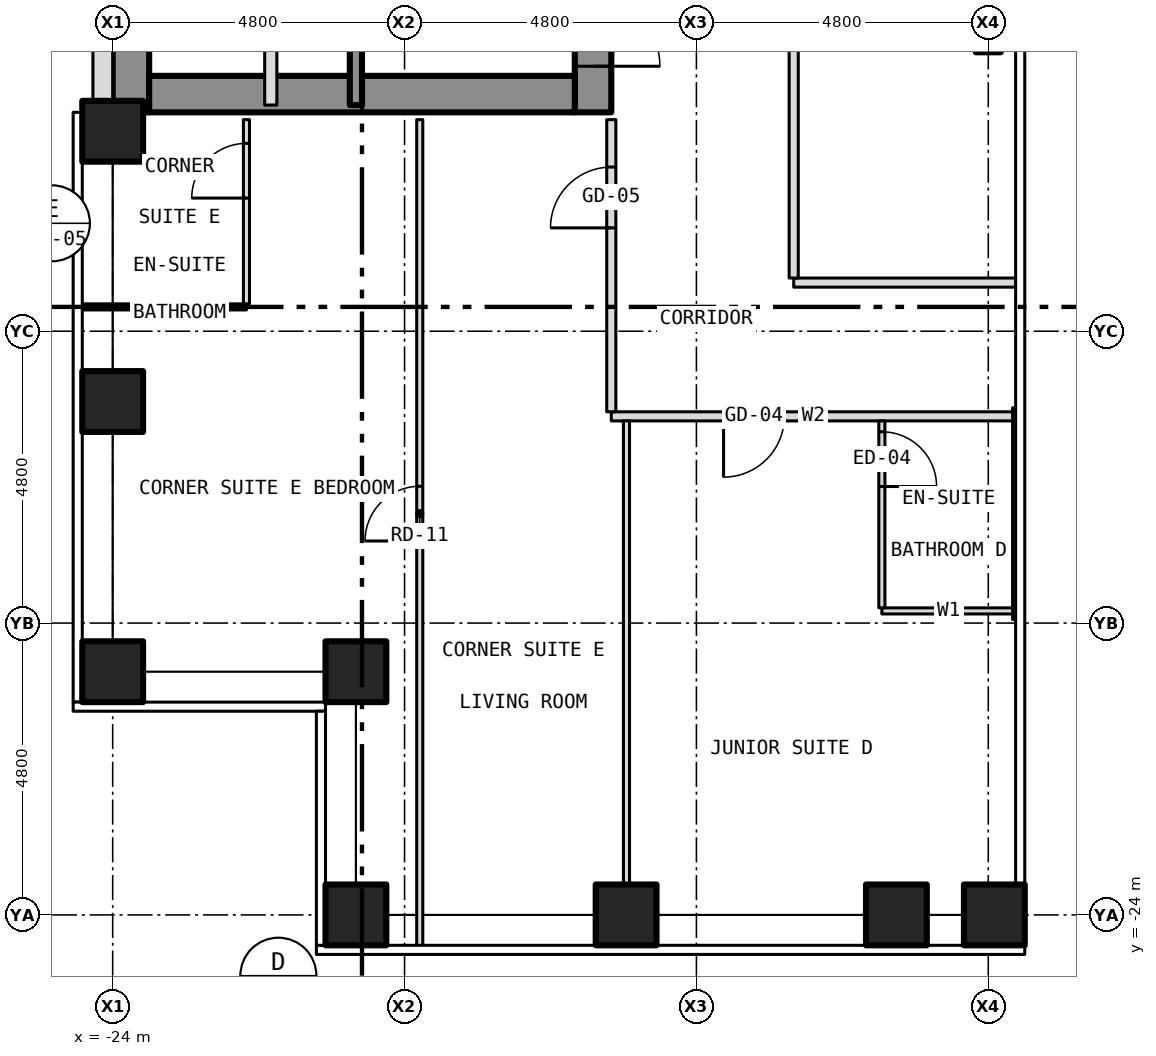
"""IFC4 building model, lengths in metres.
Left out: names, types, materials, properties, quantities, classifications, styles, units other than length and angle.
Written with IfcOpenShell. Run it as: python <this file> out.ifc"""

import sys

from ifc_helpers import new_model, si_unit, direction, frame, frame_2d, origin, origin_2d, place, context, subcontext, project, spatial, rectangle, hollow_rectangle, i_section, extrude, element, fill, save


model = new_model("IFC4")
c1 = context("Model", 3, precision=1e-05, world=origin(), true_north=direction((0.0, 1.0)))
c2 = subcontext(c1, "Body", "Model", "MODEL_VIEW")
j1 = project(units=[si_unit("LENGTHUNIT", "METRE"), si_unit("PLANEANGLEUNIT", "RADIAN")], contexts=[c1])
p1 = place(None, origin())
s1 = spatial("IfcSite", under=j1, at=p1, CompositionType="ELEMENT")
p2 = place(p1, origin())
s2 = spatial("IfcBuilding", under=s1, at=p2, CompositionType="ELEMENT")
p3 = place(p2, frame((0.0, 0.0, 63.5)))
s3 = spatial("IfcBuildingStorey", under=s2, at=p3, CompositionType="ELEMENT", Elevation=63.5)
for number, where, z_axis, x_axis in (
    (1, (-20.0, -24.0, -0.15), (0.0, 0.0, 1.0), (1.0, 0.0, 0.0)),
    (2, (-15.556, -24.0, -0.15), (0.0, 0.0, 1.0), (1.0, 0.0, 0.0)),
    (3, (-11.111, -24.0, -0.15), (0.0, 0.0, 1.0), (1.0, 0.0, 0.0)),
    (4, (-24.0, -20.0, -0.15), (0.0, 0.0, 1.0), (1.0, 0.0, 0.0)),
    (5, (-24.0, -15.556, -0.15), (0.0, 0.0, 1.0), (1.0, 0.0, 0.0)),
    (6, (-24.0, -11.111, -0.15), (0.0, 0.0, 1.0), (1.0, 0.0, 0.0)),
    (7, (-20.0, -20.0, -0.15), (0.0, 0.0, 1.0), (1.0, 0.0, 0.0)),
    (8, (-9.5, -24.0, -0.15), (0.0, 0.0, 1.0), (1.0, 0.0, 0.0)),
):
    element("IfcColumn", number, at=place(p3, frame(where, z_axis=z_axis, x_axis=x_axis)), inside=s3, PredefinedType="COLUMN", context=c2, shape_type="SweptSolid", body=[
        extrude(hollow_rectangle(XDim=1.0, YDim=1.0, WallThickness=0.06, at=origin_2d()), origin(), (0.0, 0.0, 1.0), 3.5),
    ])
p4 = place(p3, frame((-9.6, -9.6, -0.15), z_axis=(0.0, 0.0, 1.0), x_axis=(1.0, 0.0, 0.0)))
e9 = element("IfcColumn", 9, at=p4, inside=s3, PredefinedType="COLUMN", context=c2, shape_type="SweptSolid", body=[
    extrude(i_section(OverallWidth=0.409, OverallDepth=0.424, WebThickness=0.033, FlangeThickness=0.052, at=origin_2d()), origin(), (0.0, 0.0, 1.0), 3.5),
])
p5 = place(p3, frame((-16.1, -10.8, 0.0), z_axis=(0.0, 0.0, 1.0), x_axis=(0.0, 1.0, 0.0)))
e10 = element("IfcWall", 10, at=p5, inside=s3, PredefinedType="SHEAR", context=c2, shape_type="SweptSolid", body=[
    extrude(rectangle(XDim=21.6, YDim=0.6, at=frame_2d((10.8, 0.0))), origin(), (0.0, 0.0, 1.0), 3.25),
])
p6 = place(p5, frame((9.4, 0.0, 0.0)))
e11 = element("IfcOpeningElement", 11, at=p6, cuts=e10, PredefinedType="OPENING", context=c2, shape_type="SweptSolid", body=[
    extrude(rectangle(XDim=1.1, YDim=2.1, at=frame_2d((0.55, 1.05))), frame((0.0, 0.312, 0.0), z_axis=(0.0, -1.0, 0.0), x_axis=(1.0, 0.0, 0.0)), (0.0, 0.0, 1.0), 0.624),
])
p7 = place(p5, frame((11.5, 0.0, 0.0)))
e12 = element("IfcOpeningElement", 12, at=p7, cuts=e10, PredefinedType="OPENING", context=c2, shape_type="SweptSolid", body=[
    extrude(rectangle(XDim=1.1, YDim=2.1, at=frame_2d((0.55, 1.05))), frame((0.0, 0.312, 0.0), z_axis=(0.0, -1.0, 0.0), x_axis=(1.0, 0.0, 0.0)), (0.0, 0.0, 1.0), 0.624),
])
p8 = place(p5, frame((13.6, 0.0, 0.0)))
e13 = element("IfcOpeningElement", 13, at=p8, cuts=e10, PredefinedType="OPENING", context=c2, shape_type="SweptSolid", body=[
    extrude(rectangle(XDim=1.1, YDim=2.1, at=frame_2d((0.55, 1.05))), frame((0.0, 0.312, 0.0), z_axis=(0.0, -1.0, 0.0), x_axis=(1.0, 0.0, 0.0)), (0.0, 0.0, 1.0), 0.624),
])
p9 = place(p5, frame((15.7, 0.0, 0.0)))
e14 = element("IfcOpeningElement", 14, at=p9, cuts=e10, PredefinedType="OPENING", context=c2, shape_type="SweptSolid", body=[
    extrude(rectangle(XDim=1.1, YDim=2.1, at=frame_2d((0.55, 1.05))), frame((0.0, 0.312, 0.0), z_axis=(0.0, -1.0, 0.0), x_axis=(1.0, 0.0, 0.0)), (0.0, 0.0, 1.0), 0.624),
])
p10 = place(p5, frame((17.8, 0.0, 0.0)))
e15 = element("IfcOpeningElement", 15, at=p10, cuts=e10, PredefinedType="OPENING", context=c2, shape_type="SweptSolid", body=[
    extrude(rectangle(XDim=1.1, YDim=2.1, at=frame_2d((0.55, 1.05))), frame((0.0, 0.312, 0.0), z_axis=(0.0, -1.0, 0.0), x_axis=(1.0, 0.0, 0.0)), (0.0, 0.0, 1.0), 0.624),
])
p11 = place(p5, frame((0.758, 0.0, 0.0)))
e16 = element("IfcOpeningElement", 16, at=p11, cuts=e10, PredefinedType="OPENING", context=c2, shape_type="SweptSolid", body=[
    extrude(rectangle(XDim=1.1, YDim=2.1, at=frame_2d((0.55, 1.05))), frame((0.0, 0.312, 0.0), z_axis=(0.0, -1.0, 0.0), x_axis=(1.0, 0.0, 0.0)), (0.0, 0.0, 1.0), 0.624),
])
p12 = place(p5, frame((7.5, 0.0, 0.0)))
e17 = element("IfcOpeningElement", 17, at=p12, cuts=e10, PredefinedType="OPENING", context=c2, shape_type="SweptSolid", body=[
    extrude(rectangle(XDim=1.1, YDim=2.1, at=frame_2d((0.55, 1.05))), frame((0.0, 0.312, 0.0), z_axis=(0.0, -1.0, 0.0), x_axis=(1.0, 0.0, 0.0)), (0.0, 0.0, 1.0), 0.624),
])
p13 = place(p3, frame((-23.7, -10.8, 0.0), z_axis=(0.0, 0.0, 1.0), x_axis=(0.0, 1.0, 0.0)))
e18 = element("IfcWall", 18, at=p13, inside=s3, PredefinedType="SHEAR", context=c2, shape_type="SweptSolid", body=[
    extrude(rectangle(XDim=21.6, YDim=0.6, at=frame_2d((10.8, 0.0))), origin(), (0.0, 0.0, 1.0), 3.25),
])
p14 = place(p3, frame((-23.4, -10.5, 0.0), z_axis=(0.0, 0.0, 1.0), x_axis=(1.0, 0.0, 0.0)))
e19 = element("IfcWall", 19, at=p14, inside=s3, PredefinedType="SHEAR", context=c2, shape_type="SweptSolid", body=[
    extrude(rectangle(XDim=7.0, YDim=0.6, at=frame_2d((3.5, 0.0))), origin(), (0.0, 0.0, 1.0), 3.25),
])
p15 = place(p3, frame((-24.163, 10.8, 0.0), z_axis=(0.0, 0.0, 1.0), x_axis=(0.0, -1.0, 0.0)))
e20 = element("IfcWall", 20, at=p15, inside=s3, PredefinedType="SOLIDWALL", context=c2, shape_type="SweptSolid", body=[
    extrude(rectangle(XDim=21.6, YDim=0.325, at=frame_2d((10.8, 0.0))), origin(), (0.0, 0.0, 1.0), 3.5),
])
p16 = place(p15, frame((18.05, 0.0, 1.0)))
e21 = element("IfcOpeningElement", 21, at=p16, cuts=e20, PredefinedType="OPENING", context=c2, shape_type="SweptSolid", body=[
    extrude(rectangle(XDim=0.6, YDim=1.5, at=frame_2d((0.3, 0.75))), frame((0.0, 0.175, 0.0), z_axis=(0.0, -1.0, 0.0), x_axis=(1.0, 0.0, 0.0)), (0.0, 0.0, 1.0), 0.349),
])
p17 = place(p3, frame((-11.35, -19.0, 0.0), z_axis=(0.0, 0.0, 1.0), x_axis=(1.0, 0.0, 0.0)))
e22 = element("IfcWall", 22, at=p17, inside=s3, PredefinedType="PARTITIONING", context=c2, shape_type="SweptSolid", body=[
    extrude(rectangle(XDim=2.2, YDim=0.1, at=frame_2d((1.1, 0.0))), origin(), (0.0, 0.0, 1.0), 3.35),
])
p18 = place(p3, frame((-15.8, -15.8, 0.0), z_axis=(0.0, 0.0, 1.0), x_axis=(1.0, 0.0, 0.0)))
e23 = element("IfcWall", 23, at=p18, inside=s3, PredefinedType="PARTITIONING", context=c2, shape_type="SweptSolid", body=[
    extrude(rectangle(XDim=6.65, YDim=0.15, at=frame_2d((3.325, 0.0))), origin(), (0.0, 0.0, 1.0), 3.35),
])
p19 = place(p18, frame((1.847, 0.0, 0.0)))
e24 = element("IfcOpeningElement", 24, at=p19, cuts=e23, PredefinedType="OPENING", context=c2, shape_type="SweptSolid", body=[
    extrude(rectangle(XDim=1.0, YDim=2.1, at=frame_2d((0.5, 1.05))), frame((0.0, 0.087, 0.0), z_axis=(0.0, -1.0, 0.0), x_axis=(1.0, 0.0, 0.0)), (0.0, 0.0, 1.0), 0.174),
])
p20 = place(p3, frame((-24.53, -14.0, 0.0), z_axis=(0.0, 0.0, 1.0), x_axis=(1.0, 0.0, 0.0)))
e25 = element("IfcWall", 25, at=p20, inside=s3, PredefinedType="PARTITIONING", context=c2, shape_type="SweptSolid", body=[
    extrude(rectangle(XDim=2.73, YDim=0.1, at=frame_2d((1.365, 0.0))), origin(), (0.0, 0.0, 1.0), 3.35),
])
p21 = place(p3, frame((-12.8, -13.6, 0.0), z_axis=(0.0, 0.0, 1.0), x_axis=(1.0, 0.0, 0.0)))
e26 = element("IfcWall", 26, at=p21, inside=s3, PredefinedType="PARTITIONING", context=c2, shape_type="SweptSolid", body=[
    extrude(rectangle(XDim=3.68, YDim=0.15, at=frame_2d((1.84, 0.0))), origin(), (0.0, 0.0, 1.0), 3.35),
])
p22 = place(p3, frame((-21.8, -13.95, 0.0), z_axis=(0.0, 0.0, 1.0), x_axis=(0.0, 1.0, 0.0)))
e27 = element("IfcWall", 27, at=p22, inside=s3, PredefinedType="PARTITIONING", context=c2, shape_type="SweptSolid", body=[
    extrude(rectangle(XDim=3.03, YDim=0.1, at=frame_2d((1.515, 0.0))), origin(), (0.0, 0.0, 1.0), 3.35),
])
p23 = place(p22, frame((1.74, 0.0, 0.0)))
e28 = element("IfcOpeningElement", 28, at=p23, cuts=e27, PredefinedType="OPENING", context=c2, shape_type="SweptSolid", body=[
    extrude(rectangle(XDim=0.9, YDim=2.1, at=frame_2d((0.45, 1.05))), frame((0.0, 0.062, 0.0), z_axis=(0.0, -1.0, 0.0), x_axis=(1.0, 0.0, 0.0)), (0.0, 0.0, 1.0), 0.124),
])
p24 = place(p3, frame((-21.4, -10.68, 0.0), z_axis=(0.0, 0.0, 1.0), x_axis=(0.0, 1.0, 0.0)))
e29 = element("IfcWall", 29, at=p24, inside=s3, PredefinedType="PARTITIONING", context=c2, shape_type="SweptSolid", body=[
    extrude(rectangle(XDim=8.68, YDim=0.2, at=frame_2d((4.34, 0.0))), origin(), (0.0, 0.0, 1.0), 3.25),
])
p25 = place(p24, frame((2.1, 0.0, 0.0)))
e30 = element("IfcOpeningElement", 30, at=p25, cuts=e29, PredefinedType="OPENING", context=c2, shape_type="SweptSolid", body=[
    extrude(rectangle(XDim=0.9, YDim=2.1, at=frame_2d((0.45, 1.05))), frame((0.0, 0.112, 0.0), z_axis=(0.0, -1.0, 0.0), x_axis=(1.0, 0.0, 0.0)), (0.0, 0.0, 1.0), 0.224),
])
p26 = place(p24, frame((6.55, 0.0, 0.0)))
e31 = element("IfcOpeningElement", 31, at=p26, cuts=e29, PredefinedType="OPENING", context=c2, shape_type="SweptSolid", body=[
    extrude(rectangle(XDim=0.9, YDim=2.1, at=frame_2d((0.45, 1.05))), frame((0.0, 0.112, 0.0), z_axis=(0.0, -1.0, 0.0), x_axis=(1.0, 0.0, 0.0)), (0.0, 0.0, 1.0), 0.224),
])
p27 = place(p3, frame((-20.0, -10.68, 0.0), z_axis=(0.0, 0.0, 1.0), x_axis=(0.0, 1.0, 0.0)))
e32 = element("IfcWall", 32, at=p27, inside=s3, PredefinedType="SHEAR", context=c2, shape_type="SweptSolid", body=[
    extrude(rectangle(XDim=6.98, YDim=0.2, at=frame_2d((3.49, 0.0))), origin(), (0.0, 0.0, 1.0), 3.25),
])
p28 = place(p3, frame((-18.95, -24.53, 0.0), z_axis=(0.0, 0.0, 1.0), x_axis=(0.0, 1.0, 0.0)))
e33 = element("IfcWall", 33, at=p28, inside=s3, PredefinedType="PARTITIONING", context=c2, shape_type="SweptSolid", body=[
    extrude(rectangle(XDim=13.61, YDim=0.1, at=frame_2d((6.805, 0.0))), origin(), (0.0, 0.0, 1.0), 3.35),
])
p29 = place(p28, frame((6.68, 0.0, 0.0)))
e34 = element("IfcOpeningElement", 34, at=p29, cuts=e33, PredefinedType="OPENING", context=c2, shape_type="SweptSolid", body=[
    extrude(rectangle(XDim=0.9, YDim=2.1, at=frame_2d((0.45, 1.05))), frame((0.0, 0.062, 0.0), z_axis=(0.0, -1.0, 0.0), x_axis=(1.0, 0.0, 0.0)), (0.0, 0.0, 1.0), 0.124),
])
p30 = place(p3, frame((-15.8, -15.725, 0.0), z_axis=(0.0, 0.0, 1.0), x_axis=(0.0, 1.0, 0.0)))
e35 = element("IfcWall", 35, at=p30, inside=s3, PredefinedType="PARTITIONING", context=c2, shape_type="SweptSolid", body=[
    extrude(rectangle(XDim=4.805, YDim=0.15, at=frame_2d((2.403, 0.0))), origin(), (0.0, 0.0, 1.0), 3.35),
])
p31 = place(p30, frame((3.025, 0.0, 0.0)))
e36 = element("IfcOpeningElement", 36, at=p31, cuts=e35, PredefinedType="OPENING", context=c2, shape_type="SweptSolid", body=[
    extrude(rectangle(XDim=1.0, YDim=2.1, at=frame_2d((0.5, 1.05))), frame((0.0, 0.087, 0.0), z_axis=(0.0, -1.0, 0.0), x_axis=(1.0, 0.0, 0.0)), (0.0, 0.0, 1.0), 0.174),
])
p32 = place(p3, frame((-15.55, -23.88, 0.0), z_axis=(0.0, 0.0, 1.0), x_axis=(0.0, 1.0, 0.0)))
e37 = element("IfcWall", 37, at=p32, inside=s3, PredefinedType="PARTITIONING", context=c2, shape_type="SweptSolid", body=[
    extrude(rectangle(XDim=8.005, YDim=0.1, at=frame_2d((4.002, 0.0))), origin(), (0.0, 0.0, 1.0), 3.35),
])
p33 = place(p3, frame((-12.8, -13.525, 0.0), z_axis=(0.0, 0.0, 1.0), x_axis=(0.0, 1.0, 0.0)))
e38 = element("IfcWall", 38, at=p33, inside=s3, PredefinedType="PARTITIONING", context=c2, shape_type="SweptSolid", body=[
    extrude(rectangle(XDim=11.525, YDim=0.15, at=frame_2d((5.762, 0.0))), origin(), (0.0, 0.0, 1.0), 3.35),
])
p34 = place(p33, frame((6.725, 0.0, 0.0)))
e39 = element("IfcOpeningElement", 39, at=p34, cuts=e38, PredefinedType="OPENING", context=c2, shape_type="SweptSolid", body=[
    extrude(rectangle(XDim=0.9, YDim=2.1, at=frame_2d((0.45, 1.05))), frame((0.0, 0.087, 0.0), z_axis=(0.0, -1.0, 0.0), x_axis=(1.0, 0.0, 0.0)), (0.0, 0.0, 1.0), 0.174),
])
p35 = place(p3, frame((-11.35, -18.95, 0.0), z_axis=(0.0, 0.0, 1.0), x_axis=(0.0, 1.0, 0.0)))
e40 = element("IfcWall", 40, at=p35, inside=s3, PredefinedType="PARTITIONING", context=c2, shape_type="SweptSolid", body=[
    extrude(rectangle(XDim=3.075, YDim=0.1, at=frame_2d((1.538, 0.0))), origin(), (0.0, 0.0, 1.0), 3.35),
])
p36 = place(p35, frame((1.996, 0.0, 0.0)))
e41 = element("IfcOpeningElement", 41, at=p36, cuts=e40, PredefinedType="OPENING", context=c2, shape_type="SweptSolid", body=[
    extrude(rectangle(XDim=0.9, YDim=2.1, at=frame_2d((0.45, 1.05))), frame((0.0, 0.062, 0.0), z_axis=(0.0, -1.0, 0.0), x_axis=(1.0, 0.0, 0.0)), (0.0, 0.0, 1.0), 0.124),
])
p37 = place(p3, frame((-9.15, -19.14, 0.0), z_axis=(0.0, 0.0, 1.0), x_axis=(0.0, 1.0, 0.0)))
e42 = element("IfcWall", 42, at=p37, inside=s3, PredefinedType="PARTITIONING", context=c2, shape_type="SweptSolid", body=[
    extrude(rectangle(XDim=3.48, YDim=0.1, at=frame_2d((1.74, 0.0))), origin(), (0.0, 0.0, 1.0), 2.733),
])
p38 = place(p11, origin())
e43 = element("IfcDoor", 43, at=p38, inside=s3, OperationType="SINGLE_SWING_LEFT", PredefinedType="DOOR", context=c2, shape_type="SweptSolid", body=[
    extrude(rectangle(XDim=1.1, YDim=2.1, at=frame_2d((0.55, 1.05))), frame((0.0, 0.025, 0.0), z_axis=(0.0, -1.0, 0.0), x_axis=(1.0, 0.0, 0.0)), (0.0, 0.0, 1.0), 0.05),
])
fill(e16, e43)
p39 = place(p19, origin())
e44 = element("IfcDoor", 44, at=p39, inside=s3, OperationType="SINGLE_SWING_LEFT", PredefinedType="DOOR", context=c2, shape_type="SweptSolid", body=[
    extrude(rectangle(XDim=1.0, YDim=2.1, at=frame_2d((0.5, 1.05))), frame((0.0, 0.025, 0.0), z_axis=(0.0, -1.0, 0.0), x_axis=(1.0, 0.0, 0.0)), (0.0, 0.0, 1.0), 0.05),
])
fill(e24, e44)
p40 = place(p36, origin())
e45 = element("IfcDoor", 45, at=p40, inside=s3, OperationType="SINGLE_SWING_LEFT", PredefinedType="DOOR", context=c2, shape_type="SweptSolid", body=[
    extrude(rectangle(XDim=0.9, YDim=2.1, at=frame_2d((0.45, 1.05))), frame((0.0, 0.025, 0.0), z_axis=(0.0, -1.0, 0.0), x_axis=(1.0, 0.0, 0.0)), (0.0, 0.0, 1.0), 0.05),
])
fill(e41, e45)
p41 = place(p31, origin())
e46 = element("IfcDoor", 46, at=p41, inside=s3, OperationType="SINGLE_SWING_LEFT", PredefinedType="DOOR", context=c2, shape_type="SweptSolid", body=[
    extrude(rectangle(XDim=1.0, YDim=2.1, at=frame_2d((0.5, 1.05))), frame((0.0, 0.025, 0.0), z_axis=(0.0, -1.0, 0.0), x_axis=(1.0, 0.0, 0.0)), (0.0, 0.0, 1.0), 0.05),
])
fill(e36, e46)
p42 = place(p29, origin())
e47 = element("IfcDoor", 47, at=p42, inside=s3, OperationType="SINGLE_SWING_LEFT", PredefinedType="DOOR", context=c2, shape_type="SweptSolid", body=[
    extrude(rectangle(XDim=0.9, YDim=2.1, at=frame_2d((0.45, 1.05))), frame((0.0, 0.025, 0.0), z_axis=(0.0, -1.0, 0.0), x_axis=(1.0, 0.0, 0.0)), (0.0, 0.0, 1.0), 0.05),
])
fill(e34, e47)
p43 = place(p23, origin())
e48 = element("IfcDoor", 48, at=p43, inside=s3, OperationType="SINGLE_SWING_LEFT", PredefinedType="DOOR", context=c2, shape_type="SweptSolid", body=[
    extrude(rectangle(XDim=0.9, YDim=2.1, at=frame_2d((0.45, 1.05))), frame((0.0, 0.025, 0.0), z_axis=(0.0, -1.0, 0.0), x_axis=(1.0, 0.0, 0.0)), (0.0, 0.0, 1.0), 0.05),
])
fill(e28, e48)
save(model, sys.argv[1])
